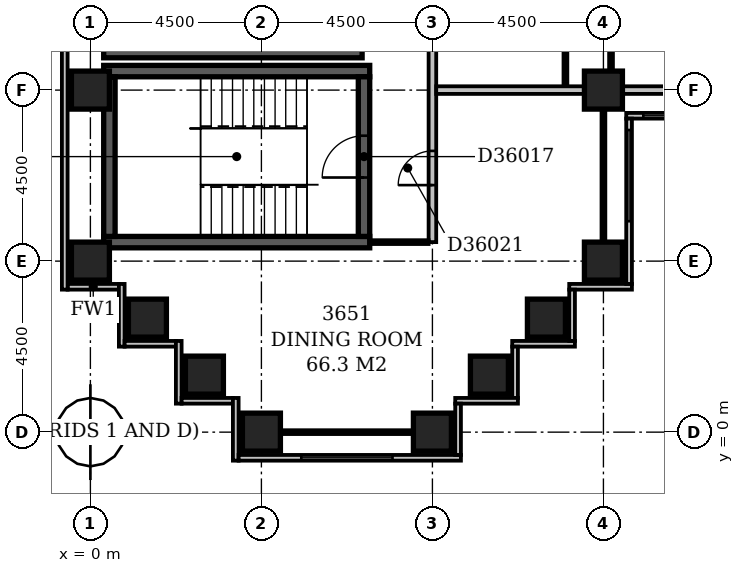
"""IFC4 building model, lengths in metres.
Left out: names, types, materials, properties, quantities, classifications, styles, units other than length and angle.
Written with IfcOpenShell. Run it as: python <this file> out.ifc"""

import sys

from ifc_helpers import new_model, si_unit, direction, frame, frame_2d, origin, origin_2d, place, context, subcontext, project, spatial, rectangle, extrude, element, fill, save


model = new_model("IFC4")
c1 = context("Model", 3, precision=1e-05, world=origin(), true_north=direction((0.0, 1.0)))
c2 = subcontext(c1, "Body", "Model", "MODEL_VIEW")
j1 = project(units=[si_unit("LENGTHUNIT", "METRE"), si_unit("PLANEANGLEUNIT", "RADIAN")], contexts=[c1])
p1 = place(None, origin())
s1 = spatial("IfcSite", under=j1, at=p1, CompositionType="ELEMENT")
p2 = place(p1, origin())
s2 = spatial("IfcBuilding", under=s1, at=p2, CompositionType="ELEMENT")
p3 = place(p2, frame((0.0, 0.0, 144.8)))
s3 = spatial("IfcBuildingStorey", under=s2, at=p3, CompositionType="ELEMENT", Elevation=144.8)
for number, where, z_axis, x_axis in (
    (1, (0.35, 5.0, -0.3), (0.0, 0.0, 1.0), (1.0, 0.0, 0.0)),
    (2, (0.35, 9.5, -0.3), (0.0, 0.0, 1.0), (1.0, 0.0, 0.0)),
):
    element("IfcWall", number, at=place(p3, frame(where, z_axis=z_axis, x_axis=x_axis)), inside=s3, PredefinedType="SHEAR", context=c2, shape_type="SweptSolid", body=[
        extrude(rectangle(XDim=7.0, YDim=0.3, at=frame_2d((3.5, 0.0))), origin(), (0.0, 0.0, 1.0), 3.6),
    ])
p4 = place(p3, frame((0.35, 10.0, -0.3), z_axis=(0.0, 0.0, 1.0), x_axis=(1.0, 0.0, 0.0)))
e3 = element("IfcWall", 3, at=p4, inside=s3, PredefinedType="SHEAR", context=c2, shape_type="SweptSolid", body=[
    extrude(rectangle(XDim=6.8, YDim=0.3, at=frame_2d((3.4, 0.0))), origin(), (0.0, 0.0, 1.0), 3.6),
])
p5 = place(p3, frame((0.5, 5.15, -0.3), z_axis=(0.0, 0.0, 1.0), x_axis=(0.0, 1.0, 0.0)))
e4 = element("IfcWall", 4, at=p5, inside=s3, PredefinedType="SHEAR", context=c2, shape_type="SweptSolid", body=[
    extrude(rectangle(XDim=4.2, YDim=0.3, at=frame_2d((2.1, 0.0))), origin(), (0.0, 0.0, 1.0), 3.6),
])
p6 = place(p3, frame((7.2, 5.15, -0.3), z_axis=(0.0, 0.0, 1.0), x_axis=(0.0, 1.0, 0.0)))
e5 = element("IfcWall", 5, at=p6, inside=s3, PredefinedType="SHEAR", context=c2, shape_type="SweptSolid", body=[
    extrude(rectangle(XDim=4.2, YDim=0.3, at=frame_2d((2.1, 0.0))), origin(), (0.0, 0.0, 1.0), 3.6),
])
p7 = place(p6, frame((1.55, 0.0, 0.3)))
e6 = element("IfcOpeningElement", 6, at=p7, cuts=e5, PredefinedType="OPENING", context=c2, shape_type="SweptSolid", body=[
    extrude(rectangle(XDim=1.1, YDim=2.1, at=frame_2d((0.55, 1.05))), frame((0.0, 0.162, 0.0), z_axis=(0.0, -1.0, 0.0), x_axis=(1.0, 0.0, 0.0)), (0.0, 0.0, 1.0), 0.324),
])
for number, where, z_axis, x_axis in (
    (7, (4.5, 0.0, -0.3), (0.0, 0.0, 1.0), (1.0, 0.0, 0.0)),
    (8, (9.0, 0.0, -0.3), (0.0, 0.0, 1.0), (1.0, 0.0, 0.0)),
    (9, (3.0, 1.5, -0.3), (0.0, 0.0, 1.0), (1.0, 0.0, 0.0)),
    (10, (10.5, 1.5, -0.3), (0.0, 0.0, 1.0), (1.0, 0.0, 0.0)),
    (11, (1.5, 3.0, -0.3), (0.0, 0.0, 1.0), (1.0, 0.0, 0.0)),
    (12, (12.0, 3.0, -0.3), (0.0, 0.0, 1.0), (1.0, 0.0, 0.0)),
    (13, (0.0, 4.5, -0.3), (0.0, 0.0, 1.0), (1.0, 0.0, 0.0)),
    (14, (13.5, 4.5, -0.3), (0.0, 0.0, 1.0), (1.0, 0.0, 0.0)),
    (15, (0.0, 9.0, -0.3), (0.0, 0.0, 1.0), (1.0, 0.0, 0.0)),
    (16, (13.5, 9.0, -0.3), (0.0, 0.0, 1.0), (1.0, 0.0, 0.0)),
):
    element("IfcColumn", number, at=place(p3, frame(where, z_axis=z_axis, x_axis=x_axis)), inside=s3, PredefinedType="COLUMN", context=c2, shape_type="SweptSolid", body=[
        extrude(rectangle(XDim=1.0, YDim=1.0, at=origin_2d()), origin(), (0.0, 0.0, 1.0), 3.6),
    ])
p8 = place(p3, frame((9.675, -0.6, 0.0), z_axis=(0.0, 0.0, 1.0), x_axis=(0.0, 1.0, 0.0)))
e17 = element("IfcWall", 17, at=p8, inside=s3, PredefinedType="STANDARD", context=c2, shape_type="SweptSolid", body=[
    extrude(rectangle(XDim=1.35, YDim=0.15, at=frame_2d((0.675, 0.0))), origin(), (0.0, 0.0, 1.0), 2.7),
])
p9 = place(p3, frame((9.6, 0.825, 0.0), z_axis=(0.0, 0.0, 1.0), x_axis=(1.0, 0.0, 0.0)))
e18 = element("IfcWall", 18, at=p9, inside=s3, PredefinedType="STANDARD", context=c2, shape_type="SweptSolid", body=[
    extrude(rectangle(XDim=1.65, YDim=0.15, at=frame_2d((0.825, 0.0))), origin(), (0.0, 0.0, 1.0), 2.7),
])
p10 = place(p3, frame((11.175, 0.9, 0.0), z_axis=(0.0, 0.0, 1.0), x_axis=(0.0, 1.0, 0.0)))
e19 = element("IfcWall", 19, at=p10, inside=s3, PredefinedType="STANDARD", context=c2, shape_type="SweptSolid", body=[
    extrude(rectangle(XDim=1.35, YDim=0.15, at=frame_2d((0.675, 0.0))), origin(), (0.0, 0.0, 1.0), 2.7),
])
p11 = place(p3, frame((11.1, 2.325, 0.0), z_axis=(0.0, 0.0, 1.0), x_axis=(1.0, 0.0, 0.0)))
e20 = element("IfcWall", 20, at=p11, inside=s3, PredefinedType="STANDARD", context=c2, shape_type="SweptSolid", body=[
    extrude(rectangle(XDim=1.65, YDim=0.15, at=frame_2d((0.825, 0.0))), origin(), (0.0, 0.0, 1.0), 2.7),
])
p12 = place(p3, frame((12.675, 2.4, 0.0), z_axis=(0.0, 0.0, 1.0), x_axis=(0.0, 1.0, 0.0)))
e21 = element("IfcWall", 21, at=p12, inside=s3, PredefinedType="STANDARD", context=c2, shape_type="SweptSolid", body=[
    extrude(rectangle(XDim=1.35, YDim=0.15, at=frame_2d((0.675, 0.0))), origin(), (0.0, 0.0, 1.0), 2.7),
])
p13 = place(p3, frame((12.6, 3.825, 0.0), z_axis=(0.0, 0.0, 1.0), x_axis=(1.0, 0.0, 0.0)))
e22 = element("IfcWall", 22, at=p13, inside=s3, PredefinedType="STANDARD", context=c2, shape_type="SweptSolid", body=[
    extrude(rectangle(XDim=1.65, YDim=0.15, at=frame_2d((0.825, 0.0))), origin(), (0.0, 0.0, 1.0), 2.7),
])
p14 = place(p3, frame((14.175, 3.9, 0.0), z_axis=(0.0, 0.0, 1.0), x_axis=(0.0, 1.0, 0.0)))
e23 = element("IfcWall", 23, at=p14, inside=s3, PredefinedType="STANDARD", context=c2, shape_type="SweptSolid", body=[
    extrude(rectangle(XDim=4.35, YDim=0.15, at=frame_2d((2.175, 0.0))), origin(), (0.0, 0.0, 1.0), 2.7),
])
p15 = place(p14, frame((1.65, 0.0, 0.6)))
e24 = element("IfcOpeningElement", 24, at=p15, cuts=e23, PredefinedType="OPENING", context=c2, shape_type="SweptSolid", body=[
    extrude(rectangle(XDim=2.4, YDim=1.8, at=frame_2d((1.2, 0.9))), frame((0.0, 0.087, 0.0), z_axis=(0.0, -1.0, 0.0), x_axis=(1.0, 0.0, 0.0)), (0.0, 0.0, 1.0), 0.174),
])
p16 = place(p3, frame((14.1, 8.325, 0.0), z_axis=(0.0, 0.0, 1.0), x_axis=(1.0, 0.0, 0.0)))
e25 = element("IfcWall", 25, at=p16, inside=s3, PredefinedType="STANDARD", context=c2, shape_type="SweptSolid", body=[
    extrude(rectangle(XDim=4.65, YDim=0.15, at=frame_2d((2.325, 0.0))), origin(), (0.0, 0.0, 1.0), 2.7),
])
p17 = place(p16, frame((0.45, 0.0, 0.6)))
e26 = element("IfcOpeningElement", 26, at=p17, cuts=e25, PredefinedType="OPENING", context=c2, shape_type="SweptSolid", body=[
    extrude(rectangle(XDim=2.4, YDim=1.8, at=frame_2d((1.2, 0.9))), frame((0.0, 0.087, 0.0), z_axis=(0.0, -1.0, 0.0), x_axis=(1.0, 0.0, 0.0)), (0.0, 0.0, 1.0), 0.174),
])
p18 = place(p3, frame((-0.675, 59.1, 0.0), z_axis=(0.0, 0.0, 1.0), x_axis=(0.0, -1.0, 0.0)))
e27 = element("IfcWall", 27, at=p18, inside=s3, PredefinedType="STANDARD", context=c2, shape_type="SweptSolid", body=[
    extrude(rectangle(XDim=55.35, YDim=0.15, at=frame_2d((27.675, 0.0))), origin(), (0.0, 0.0, 1.0), 2.7),
])
p19 = place(p3, frame((-0.6, 3.825, 0.0), z_axis=(0.0, 0.0, 1.0), x_axis=(1.0, 0.0, 0.0)))
e28 = element("IfcWall", 28, at=p19, inside=s3, PredefinedType="STANDARD", context=c2, shape_type="SweptSolid", body=[
    extrude(rectangle(XDim=1.35, YDim=0.15, at=frame_2d((0.675, 0.0))), origin(), (0.0, 0.0, 1.0), 2.7),
])
p20 = place(p3, frame((0.825, 3.9, 0.0), z_axis=(0.0, 0.0, 1.0), x_axis=(0.0, -1.0, 0.0)))
e29 = element("IfcWall", 29, at=p20, inside=s3, PredefinedType="STANDARD", context=c2, shape_type="SweptSolid", body=[
    extrude(rectangle(XDim=1.65, YDim=0.15, at=frame_2d((0.825, 0.0))), origin(), (0.0, 0.0, 1.0), 2.7),
])
p21 = place(p3, frame((0.9, 2.325, 0.0), z_axis=(0.0, 0.0, 1.0), x_axis=(1.0, 0.0, 0.0)))
e30 = element("IfcWall", 30, at=p21, inside=s3, PredefinedType="STANDARD", context=c2, shape_type="SweptSolid", body=[
    extrude(rectangle(XDim=1.35, YDim=0.15, at=frame_2d((0.675, 0.0))), origin(), (0.0, 0.0, 1.0), 2.7),
])
p22 = place(p3, frame((2.325, 2.4, 0.0), z_axis=(0.0, 0.0, 1.0), x_axis=(0.0, -1.0, 0.0)))
e31 = element("IfcWall", 31, at=p22, inside=s3, PredefinedType="STANDARD", context=c2, shape_type="SweptSolid", body=[
    extrude(rectangle(XDim=1.65, YDim=0.15, at=frame_2d((0.825, 0.0))), origin(), (0.0, 0.0, 1.0), 2.7),
])
p23 = place(p3, frame((2.4, 0.825, 0.0), z_axis=(0.0, 0.0, 1.0), x_axis=(1.0, 0.0, 0.0)))
e32 = element("IfcWall", 32, at=p23, inside=s3, PredefinedType="STANDARD", context=c2, shape_type="SweptSolid", body=[
    extrude(rectangle(XDim=1.35, YDim=0.15, at=frame_2d((0.675, 0.0))), origin(), (0.0, 0.0, 1.0), 2.7),
])
p24 = place(p3, frame((3.825, 0.9, 0.0), z_axis=(0.0, 0.0, 1.0), x_axis=(0.0, -1.0, 0.0)))
e33 = element("IfcWall", 33, at=p24, inside=s3, PredefinedType="STANDARD", context=c2, shape_type="SweptSolid", body=[
    extrude(rectangle(XDim=1.65, YDim=0.15, at=frame_2d((0.825, 0.0))), origin(), (0.0, 0.0, 1.0), 2.7),
])
p25 = place(p3, frame((3.9, -0.675, 0.0), z_axis=(0.0, 0.0, 1.0), x_axis=(1.0, 0.0, 0.0)))
e34 = element("IfcWall", 34, at=p25, inside=s3, PredefinedType="STANDARD", context=c2, shape_type="SweptSolid", body=[
    extrude(rectangle(XDim=5.85, YDim=0.15, at=frame_2d((2.925, 0.0))), origin(), (0.0, 0.0, 1.0), 2.7),
])
p26 = place(p25, frame((1.65, 0.0, 0.6)))
e35 = element("IfcOpeningElement", 35, at=p26, cuts=e34, PredefinedType="OPENING", context=c2, shape_type="SweptSolid", body=[
    extrude(rectangle(XDim=2.4, YDim=1.8, at=frame_2d((1.2, 0.9))), frame((0.0, 0.087, 0.0), z_axis=(0.0, -1.0, 0.0), x_axis=(1.0, 0.0, 0.0)), (0.0, 0.0, 1.0), 0.174),
])
p27 = place(p3, frame((5.0, 0.0, 0.0), z_axis=(0.0, 0.0, 1.0), x_axis=(1.0, 0.0, 0.0)))
e36 = element("IfcWall", 36, at=p27, inside=s3, PredefinedType="PARTITIONING", context=c2, shape_type="SweptSolid", body=[
    extrude(rectangle(XDim=3.5, YDim=0.1, at=frame_2d((1.75, 0.0))), origin(), (0.0, 0.0, 1.0), 2.7),
])
p28 = place(p3, frame((0.0, 4.5, 0.0), z_axis=(0.0, 0.0, 1.0), x_axis=(0.0, 1.0, 0.0)))
e37 = element("IfcWall", 37, at=p28, inside=s3, PredefinedType="PARTITIONING", context=c2, shape_type="SweptSolid", body=[
    extrude(rectangle(XDim=0.5, YDim=0.1, at=frame_2d((0.25, 0.0))), origin(), (0.0, 0.0, 1.0), 2.7),
])
p29 = place(p3, frame((7.349, 5.0, 0.0), z_axis=(0.0, 0.0, 1.0), x_axis=(1.0, 0.0, 0.0)))
e38 = element("IfcWall", 38, at=p29, inside=s3, PredefinedType="PARTITIONING", context=c2, shape_type="SweptSolid", body=[
    extrude(rectangle(XDim=1.551, YDim=0.1, at=frame_2d((0.775, 0.0))), origin(), (0.0, 0.0, 1.0), 3.3),
])
p30 = place(p3, frame((9.0, 5.0, 0.0), z_axis=(0.0, 0.0, 1.0), x_axis=(0.0, 1.0, 0.0)))
e39 = element("IfcWall", 39, at=p30, inside=s3, PredefinedType="PARTITIONING", context=c2, shape_type="SweptSolid", body=[
    extrude(rectangle(XDim=27.75, YDim=0.2, at=frame_2d((13.875, 0.0))), origin(), (0.0, 0.0, 1.0), 3.3),
])
p31 = place(p30, frame((17.8, 0.0, 0.0)))
e40 = element("IfcOpeningElement", 40, at=p31, cuts=e39, PredefinedType="OPENING", context=c2, shape_type="SweptSolid", body=[
    extrude(rectangle(XDim=1.0, YDim=2.1, at=frame_2d((0.5, 1.05))), frame((0.0, 0.112, 0.0), z_axis=(0.0, -1.0, 0.0), x_axis=(1.0, 0.0, 0.0)), (0.0, 0.0, 1.0), 0.224),
])
p32 = place(p30, frame((14.95, 0.0, 0.0)))
e41 = element("IfcOpeningElement", 41, at=p32, cuts=e39, PredefinedType="OPENING", context=c2, shape_type="SweptSolid", body=[
    extrude(rectangle(XDim=1.0, YDim=2.1, at=frame_2d((0.5, 1.05))), frame((0.0, 0.112, 0.0), z_axis=(0.0, -1.0, 0.0), x_axis=(1.0, 0.0, 0.0)), (0.0, 0.0, 1.0), 0.224),
])
p33 = place(p30, frame((11.7, 0.0, 0.0)))
e42 = element("IfcOpeningElement", 42, at=p33, cuts=e39, PredefinedType="OPENING", context=c2, shape_type="SweptSolid", body=[
    extrude(rectangle(XDim=1.0, YDim=2.1, at=frame_2d((0.5, 1.05))), frame((0.0, 0.112, 0.0), z_axis=(0.0, -1.0, 0.0), x_axis=(1.0, 0.0, 0.0)), (0.0, 0.0, 1.0), 0.224),
])
p34 = place(p30, frame((1.5, 0.0, 0.0)))
e43 = element("IfcOpeningElement", 43, at=p34, cuts=e39, PredefinedType="OPENING", context=c2, shape_type="SweptSolid", body=[
    extrude(rectangle(XDim=0.9, YDim=2.1, at=frame_2d((0.45, 1.05))), frame((0.0, 0.112, 0.0), z_axis=(0.0, -1.0, 0.0), x_axis=(1.0, 0.0, 0.0)), (0.0, 0.0, 1.0), 0.224),
])
p35 = place(p3, frame((13.5, 5.0, 0.0), z_axis=(0.0, 0.0, 1.0), x_axis=(0.0, 1.0, 0.0)))
e44 = element("IfcWall", 44, at=p35, inside=s3, PredefinedType="PARTITIONING", context=c2, shape_type="SweptSolid", body=[
    extrude(rectangle(XDim=3.5, YDim=0.1, at=frame_2d((1.75, 0.0))), origin(), (0.0, 0.0, 1.0), 2.7),
])
p36 = place(p3, frame((9.1, 9.0, 0.0), z_axis=(0.0, 0.0, 1.0), x_axis=(1.0, 0.0, 0.0)))
e45 = element("IfcWall", 45, at=p36, inside=s3, PredefinedType="PARTITIONING", context=c2, shape_type="SweptSolid", body=[
    extrude(rectangle(XDim=3.9, YDim=0.2, at=frame_2d((1.95, 0.0))), origin(), (0.0, 0.0, 1.0), 3.3),
])
p37 = place(p3, frame((14.0, 9.0, 0.0), z_axis=(0.0, 0.0, 1.0), x_axis=(1.0, 0.0, 0.0)))
e46 = element("IfcWall", 46, at=p37, inside=s3, PredefinedType="PARTITIONING", context=c2, shape_type="SweptSolid", body=[
    extrude(rectangle(XDim=3.5, YDim=0.2, at=frame_2d((1.75, 0.0))), origin(), (0.0, 0.0, 1.0), 2.7),
])
p38 = place(p3, frame((12.5, 9.1, 0.0), z_axis=(0.0, 0.0, 1.0), x_axis=(0.0, 1.0, 0.0)))
e47 = element("IfcWall", 47, at=p38, inside=s3, PredefinedType="PARTITIONING", context=c2, shape_type="SweptSolid", body=[
    extrude(rectangle(XDim=7.3, YDim=0.1, at=frame_2d((3.65, 0.0))), origin(), (0.0, 0.0, 1.0), 3.3),
])
p39 = place(p38, frame((5.7, 0.0, 0.0)))
e48 = element("IfcOpeningElement", 48, at=p39, cuts=e47, PredefinedType="OPENING", context=c2, shape_type="SweptSolid", body=[
    extrude(rectangle(XDim=0.8, YDim=2.1, at=frame_2d((0.4, 1.05))), frame((0.0, 0.062, 0.0), z_axis=(0.0, -1.0, 0.0), x_axis=(1.0, 0.0, 0.0)), (0.0, 0.0, 1.0), 0.124),
])
p40 = place(p38, frame((1.95, 0.0, 0.0)))
e49 = element("IfcOpeningElement", 49, at=p40, cuts=e47, PredefinedType="OPENING", context=c2, shape_type="SweptSolid", body=[
    extrude(rectangle(XDim=0.9, YDim=2.1, at=frame_2d((0.45, 1.05))), frame((0.0, 0.062, 0.0), z_axis=(0.0, -1.0, 0.0), x_axis=(1.0, 0.0, 0.0)), (0.0, 0.0, 1.0), 0.124),
])
p41 = place(p3, frame((13.7, 9.5, 0.0), z_axis=(0.0, 0.0, 1.0), x_axis=(0.0, 1.0, 0.0)))
e50 = element("IfcWall", 50, at=p41, inside=s3, PredefinedType="PARTITIONING", context=c2, shape_type="SweptSolid", body=[
    extrude(rectangle(XDim=8.4, YDim=0.1, at=frame_2d((4.2, 0.0))), origin(), (0.0, 0.0, 1.0), 3.3),
])
p42 = place(p41, frame((1.3, 0.0, 0.0)))
e51 = element("IfcOpeningElement", 51, at=p42, cuts=e50, PredefinedType="OPENING", context=c2, shape_type="SweptSolid", body=[
    extrude(rectangle(XDim=0.9, YDim=2.1, at=frame_2d((0.45, 1.05))), frame((0.0, 0.062, 0.0), z_axis=(0.0, -1.0, 0.0), x_axis=(1.0, 0.0, 0.0)), (0.0, 0.0, 1.0), 0.124),
])
p43 = place(p41, frame((5.8, 0.0, 0.0)))
e52 = element("IfcOpeningElement", 52, at=p43, cuts=e50, PredefinedType="OPENING", context=c2, shape_type="SweptSolid", body=[
    extrude(rectangle(XDim=0.9, YDim=2.1, at=frame_2d((0.45, 1.05))), frame((0.0, 0.062, 0.0), z_axis=(0.0, -1.0, 0.0), x_axis=(1.0, 0.0, 0.0)), (0.0, 0.0, 1.0), 0.124),
])
p44 = place(p15, origin())
e53 = element("IfcWindow", 53, at=p44, inside=s3, PartitioningType="SINGLE_PANEL", PredefinedType="WINDOW", context=c2, shape_type="SweptSolid", body=[
    extrude(rectangle(XDim=2.4, YDim=1.8, at=frame_2d((1.2, 0.9))), frame((0.0, 0.03, 0.0), z_axis=(0.0, -1.0, 0.0), x_axis=(1.0, 0.0, 0.0)), (0.0, 0.0, 1.0), 0.06),
])
fill(e24, e53)
p45 = place(p17, origin())
e54 = element("IfcWindow", 54, at=p45, inside=s3, PartitioningType="SINGLE_PANEL", PredefinedType="WINDOW", context=c2, shape_type="SweptSolid", body=[
    extrude(rectangle(XDim=2.4, YDim=1.8, at=frame_2d((1.2, 0.9))), frame((0.0, 0.03, 0.0), z_axis=(0.0, -1.0, 0.0), x_axis=(1.0, 0.0, 0.0)), (0.0, 0.0, 1.0), 0.06),
])
fill(e26, e54)
p46 = place(p26, origin())
e55 = element("IfcWindow", 55, at=p46, inside=s3, PartitioningType="SINGLE_PANEL", PredefinedType="WINDOW", context=c2, shape_type="SweptSolid", body=[
    extrude(rectangle(XDim=2.4, YDim=1.8, at=frame_2d((1.2, 0.9))), frame((0.0, 0.03, 0.0), z_axis=(0.0, -1.0, 0.0), x_axis=(1.0, 0.0, 0.0)), (0.0, 0.0, 1.0), 0.06),
])
fill(e35, e55)
p47 = place(p7, origin())
e56 = element("IfcDoor", 56, at=p47, inside=s3, OperationType="SINGLE_SWING_LEFT", PredefinedType="DOOR", context=c2, shape_type="SweptSolid", body=[
    extrude(rectangle(XDim=1.1, YDim=2.1, at=frame_2d((0.55, 1.05))), frame((0.0, 0.025, 0.0), z_axis=(0.0, -1.0, 0.0), x_axis=(1.0, 0.0, 0.0)), (0.0, 0.0, 1.0), 0.05),
])
fill(e6, e56)
p48 = place(p34, origin())
e57 = element("IfcDoor", 57, at=p48, inside=s3, OperationType="SINGLE_SWING_LEFT", PredefinedType="DOOR", context=c2, shape_type="SweptSolid", body=[
    extrude(rectangle(XDim=0.9, YDim=2.1, at=frame_2d((0.45, 1.05))), frame((0.0, 0.025, 0.0), z_axis=(0.0, -1.0, 0.0), x_axis=(1.0, 0.0, 0.0)), (0.0, 0.0, 1.0), 0.05),
])
fill(e43, e57)
save(model, sys.argv[1])
